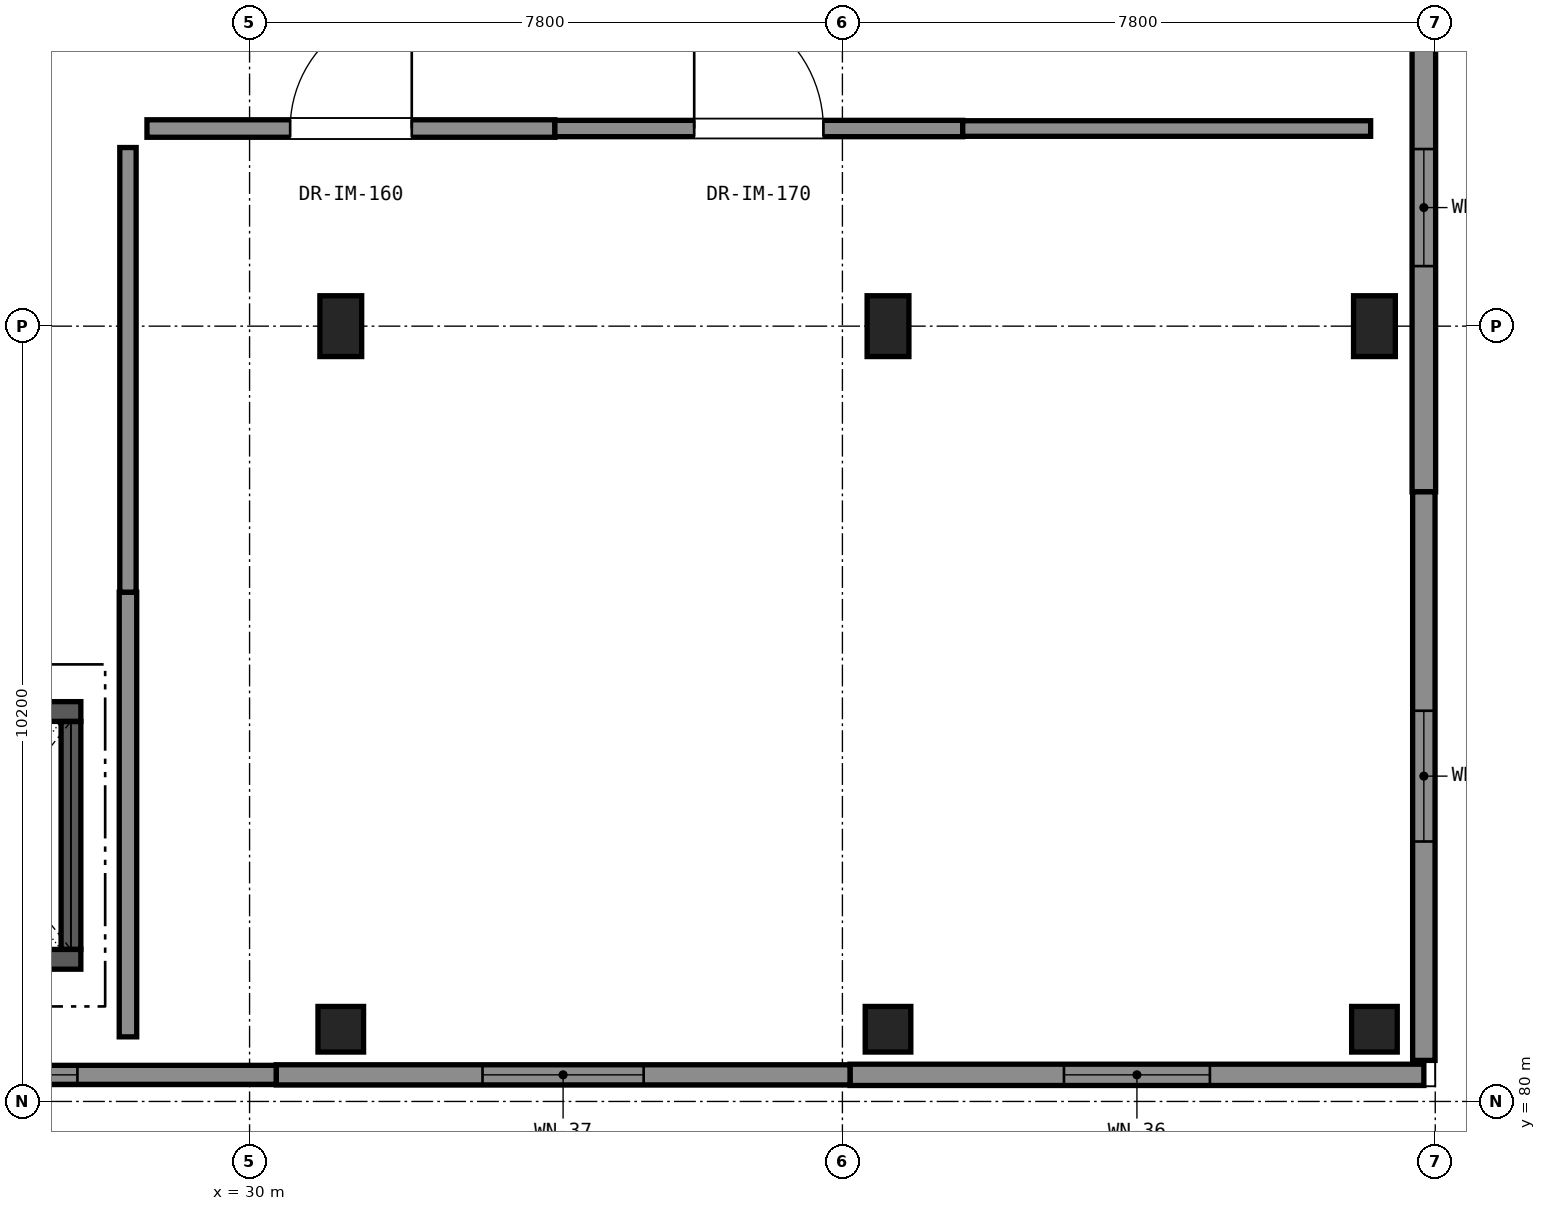
"""IFC4 building model, lengths in metres.
Left out: names, types, materials, properties, quantities, classifications, styles, units other than length and angle.
Written with IfcOpenShell. Run it as: python <this file> out.ifc"""

import sys

from ifc_helpers import new_model, si_unit, direction, frame, frame_2d, origin, origin_2d, place, context, subcontext, project, spatial, rectangle, extrude, element, fill, save


model = new_model("IFC4")
c1 = context("Model", 3, precision=1e-05, world=origin(), true_north=direction((0.0, 1.0)))
c2 = subcontext(c1, "Body", "Model", "MODEL_VIEW")
j1 = project(units=[si_unit("LENGTHUNIT", "METRE"), si_unit("PLANEANGLEUNIT", "RADIAN")], contexts=[c1])
p1 = place(None, origin())
s1 = spatial("IfcSite", under=j1, at=p1, CompositionType="ELEMENT")
p2 = place(p1, origin())
s2 = spatial("IfcBuilding", under=s1, at=p2, CompositionType="ELEMENT")
p3 = place(p2, frame((0.0, 0.0, 9.52)))
s3 = spatial("IfcBuildingStorey", under=s2, at=p3, CompositionType="ELEMENT", Elevation=9.52)
p4 = place(p3, frame((31.2, 80.95, 0.0), z_axis=(0.0, 0.0, 1.0), x_axis=(1.0, 0.0, 0.0)))
e1 = element("IfcColumn", 1, at=p4, inside=s3, PredefinedType="COLUMN", context=c2, shape_type="SweptSolid", body=[
    extrude(rectangle(XDim=0.6, YDim=0.6, at=origin_2d()), origin(), (0.0, 0.0, 1.0), 4.08),
])
p5 = place(p3, frame((31.2, 90.2, 0.0), z_axis=(0.0, 0.0, 1.0), x_axis=(1.0, 0.0, 0.0)))
e2 = element("IfcColumn", 2, at=p5, inside=s3, PredefinedType="COLUMN", context=c2, shape_type="SweptSolid", body=[
    extrude(rectangle(XDim=0.55, YDim=0.8, at=origin_2d()), origin(), (0.0, 0.0, 1.0), 4.08),
])
p6 = place(p3, frame((38.4, 80.95, 0.0), z_axis=(0.0, 0.0, 1.0), x_axis=(1.0, 0.0, 0.0)))
e3 = element("IfcColumn", 3, at=p6, inside=s3, PredefinedType="COLUMN", context=c2, shape_type="SweptSolid", body=[
    extrude(rectangle(XDim=0.6, YDim=0.6, at=origin_2d()), origin(), (0.0, 0.0, 1.0), 4.08),
])
p7 = place(p3, frame((38.4, 90.2, 0.0), z_axis=(0.0, 0.0, 1.0), x_axis=(1.0, 0.0, 0.0)))
e4 = element("IfcColumn", 4, at=p7, inside=s3, PredefinedType="COLUMN", context=c2, shape_type="SweptSolid", body=[
    extrude(rectangle(XDim=0.55, YDim=0.8, at=origin_2d()), origin(), (0.0, 0.0, 1.0), 4.08),
])
p8 = place(p3, frame((44.8, 80.95, 0.0), z_axis=(0.0, 0.0, 1.0), x_axis=(1.0, 0.0, 0.0)))
e5 = element("IfcColumn", 5, at=p8, inside=s3, PredefinedType="COLUMN", context=c2, shape_type="SweptSolid", body=[
    extrude(rectangle(XDim=0.6, YDim=0.6, at=origin_2d()), origin(), (0.0, 0.0, 1.0), 4.08),
])
p9 = place(p3, frame((44.8, 90.2, 0.0), z_axis=(0.0, 0.0, 1.0), x_axis=(1.0, 0.0, 0.0)))
e6 = element("IfcColumn", 6, at=p9, inside=s3, PredefinedType="COLUMN", context=c2, shape_type="SweptSolid", body=[
    extrude(rectangle(XDim=0.55, YDim=0.8, at=origin_2d()), origin(), (0.0, 0.0, 1.0), 4.08),
])
p10 = place(p3, frame((45.45, 95.5, 0.0), z_axis=(0.0, 0.0, 1.0), x_axis=(0.0, -1.0, 0.0)))
e7 = element("IfcWall", 7, at=p10, inside=s3, PredefinedType="SOLIDWALL", context=c2, shape_type="SweptSolid", body=[
    extrude(rectangle(XDim=7.48, YDim=0.31, at=frame_2d((3.74, 0.0))), origin(), (0.0, 0.0, 1.0), 3.843),
])
p11 = place(p10, frame((2.97, 0.0, 0.9)))
e8 = element("IfcOpeningElement", 8, at=p11, cuts=e7, PredefinedType="OPENING", context=c2, shape_type="SweptSolid", body=[
    extrude(rectangle(XDim=1.54, YDim=1.62, at=frame_2d((0.77, 0.81))), frame((0.0, 0.165, 0.0), z_axis=(0.0, -1.0, 0.0), x_axis=(1.0, 0.0, 0.0)), (0.0, 0.0, 1.0), 0.33),
])
p12 = place(p3, frame((45.45, 88.02, 0.0), z_axis=(0.0, 0.0, 1.0), x_axis=(0.0, -1.0, 0.0)))
e9 = element("IfcWall", 9, at=p12, inside=s3, PredefinedType="SOLIDWALL", context=c2, shape_type="SweptSolid", body=[
    extrude(rectangle(XDim=7.48, YDim=0.295, at=frame_2d((3.74, 0.0))), origin(), (0.0, 0.0, 1.0), 3.843),
])
p13 = place(p12, frame((2.88, 0.0, 0.9)))
e10 = element("IfcOpeningElement", 10, at=p13, cuts=e9, PredefinedType="OPENING", context=c2, shape_type="SweptSolid", body=[
    extrude(rectangle(XDim=1.72, YDim=1.62, at=frame_2d((0.86, 0.81))), frame((0.0, 0.157, 0.0), z_axis=(0.0, -1.0, 0.0), x_axis=(1.0, 0.0, 0.0)), (0.0, 0.0, 1.0), 0.315),
])
p14 = place(p3, frame((45.45, 80.35, 0.0), z_axis=(0.0, 0.0, 1.0), x_axis=(-1.0, 0.0, 0.0)))
e11 = element("IfcWall", 11, at=p14, inside=s3, PredefinedType="SOLIDWALL", context=c2, shape_type="SweptSolid", body=[
    extrude(rectangle(XDim=7.55, YDim=0.28, at=frame_2d((3.775, 0.0))), origin(), (0.0, 0.0, 1.0), 3.843),
])
p15 = place(p14, frame((2.815, 0.0, 0.9)))
e12 = element("IfcOpeningElement", 12, at=p15, cuts=e11, PredefinedType="OPENING", context=c2, shape_type="SweptSolid", body=[
    extrude(rectangle(XDim=1.92, YDim=1.62, at=frame_2d((0.96, 0.81))), frame((0.0, 0.15, 0.0), z_axis=(0.0, -1.0, 0.0), x_axis=(1.0, 0.0, 0.0)), (0.0, 0.0, 1.0), 0.3),
])
p16 = place(p3, frame((37.9, 80.35, 0.0), z_axis=(0.0, 0.0, 1.0), x_axis=(-1.0, 0.0, 0.0)))
e13 = element("IfcWall", 13, at=p16, inside=s3, PredefinedType="SOLIDWALL", context=c2, shape_type="SweptSolid", body=[
    extrude(rectangle(XDim=7.55, YDim=0.265, at=frame_2d((3.775, 0.0))), origin(), (0.0, 0.0, 1.0), 3.843),
])
p17 = place(p16, frame((2.715, 0.0, 0.9)))
e14 = element("IfcOpeningElement", 14, at=p17, cuts=e13, PredefinedType="OPENING", context=c2, shape_type="SweptSolid", body=[
    extrude(rectangle(XDim=2.12, YDim=1.62, at=frame_2d((1.06, 0.81))), frame((0.0, 0.142, 0.0), z_axis=(0.0, -1.0, 0.0), x_axis=(1.0, 0.0, 0.0)), (0.0, 0.0, 1.0), 0.285),
])
p18 = place(p3, frame((30.35, 80.35, 0.0), z_axis=(0.0, 0.0, 1.0), x_axis=(-1.0, 0.0, 0.0)))
e15 = element("IfcWall", 15, at=p18, inside=s3, PredefinedType="SOLIDWALL", context=c2, shape_type="SweptSolid", body=[
    extrude(rectangle(XDim=7.55, YDim=0.25, at=frame_2d((3.775, 0.0))), origin(), (0.0, 0.0, 1.0), 3.843),
])
p19 = place(p18, frame((2.615, 0.0, 0.9)))
e16 = element("IfcOpeningElement", 16, at=p19, cuts=e15, PredefinedType="OPENING", context=c2, shape_type="SweptSolid", body=[
    extrude(rectangle(XDim=2.32, YDim=1.62, at=frame_2d((1.16, 0.81))), frame((0.0, 0.135, 0.0), z_axis=(0.0, -1.0, 0.0), x_axis=(1.0, 0.0, 0.0)), (0.0, 0.0, 1.0), 0.27),
])
p20 = place(p3, frame((25.122, 81.87, 0.0), z_axis=(0.0, 0.0, 1.0), x_axis=(1.0, 0.0, 0.0)))
e17 = element("IfcWall", 17, at=p20, inside=s3, PredefinedType="SHEAR", context=c2, shape_type="SweptSolid", body=[
    extrude(rectangle(XDim=2.658, YDim=0.26, at=frame_2d((1.329, 0.0))), origin(), (0.0, 0.0, 1.0), 3.843),
])
p21 = place(p3, frame((25.122, 85.13, 0.0), z_axis=(0.0, 0.0, 1.0), x_axis=(1.0, 0.0, 0.0)))
e18 = element("IfcWall", 18, at=p21, inside=s3, PredefinedType="SHEAR", context=c2, shape_type="SweptSolid", body=[
    extrude(rectangle(XDim=2.658, YDim=0.26, at=frame_2d((1.329, 0.0))), origin(), (0.0, 0.0, 1.0), 3.843),
])
p22 = place(p21, frame((0.679, 0.0, 0.0)))
e19 = element("IfcOpeningElement", 19, at=p22, cuts=e18, PredefinedType="OPENING", context=c2, shape_type="SweptSolid", body=[
    extrude(rectangle(XDim=1.3, YDim=2.2, at=frame_2d((0.65, 1.1))), frame((0.0, 0.14, 0.0), z_axis=(0.0, -1.0, 0.0), x_axis=(1.0, 0.0, 0.0)), (0.0, 0.0, 1.0), 0.28),
])
p23 = place(p3, frame((27.65, 82.002, 0.0), z_axis=(0.0, 0.0, 1.0), x_axis=(0.0, 1.0, 0.0)))
e20 = element("IfcWall", 20, at=p23, inside=s3, PredefinedType="SHEAR", context=c2, shape_type="SweptSolid", body=[
    extrude(rectangle(XDim=2.996, YDim=0.26, at=frame_2d((1.498, 0.0))), origin(), (0.0, 0.0, 1.0), 3.843),
])
p24 = place(p3, frame((28.65, 92.8, 0.0), z_axis=(0.0, 0.0, 1.0), x_axis=(1.0, 0.0, 0.0)))
e21 = element("IfcWall", 21, at=p24, inside=s3, PredefinedType="PARTITIONING", context=c2, shape_type="SweptSolid", body=[
    extrude(rectangle(XDim=5.367, YDim=0.23, at=frame_2d((2.684, 0.0))), origin(), (0.0, 0.0, 1.0), 3.293),
])
p25 = place(p24, frame((1.884, 0.0, 0.0)))
e22 = element("IfcOpeningElement", 22, at=p25, cuts=e21, PredefinedType="OPENING", context=c2, shape_type="SweptSolid", body=[
    extrude(rectangle(XDim=1.6, YDim=2.35, at=frame_2d((0.8, 1.175))), frame((0.0, 0.125, 0.0), z_axis=(0.0, -1.0, 0.0), x_axis=(1.0, 0.0, 0.0)), (0.0, 0.0, 1.0), 0.25),
])
p26 = place(p3, frame((34.017, 92.8, 0.0), z_axis=(0.0, 0.0, 1.0), x_axis=(1.0, 0.0, 0.0)))
e23 = element("IfcWall", 23, at=p26, inside=s3, PredefinedType="PARTITIONING", context=c2, shape_type="SweptSolid", body=[
    extrude(rectangle(XDim=5.366, YDim=0.215, at=frame_2d((2.683, 0.0))), origin(), (0.0, 0.0, 1.0), 3.143),
])
p27 = place(p26, frame((1.833, 0.0, 0.0)))
e24 = element("IfcOpeningElement", 24, at=p27, cuts=e23, PredefinedType="OPENING", context=c2, shape_type="SweptSolid", body=[
    extrude(rectangle(XDim=1.7, YDim=2.35, at=frame_2d((0.85, 1.175))), frame((0.0, 0.117, 0.0), z_axis=(0.0, -1.0, 0.0), x_axis=(1.0, 0.0, 0.0)), (0.0, 0.0, 1.0), 0.235),
])
p28 = place(p3, frame((39.383, 92.8, 0.0), z_axis=(0.0, 0.0, 1.0), x_axis=(1.0, 0.0, 0.0)))
e25 = element("IfcWall", 25, at=p28, inside=s3, PredefinedType="PARTITIONING", context=c2, shape_type="SweptSolid", body=[
    extrude(rectangle(XDim=5.367, YDim=0.205, at=frame_2d((2.684, 0.0))), origin(), (0.0, 0.0, 1.0), 3.043),
])
p29 = place(p3, frame((28.4, 80.85, 0.0), z_axis=(0.0, 0.0, 1.0), x_axis=(0.0, 1.0, 0.0)))
e26 = element("IfcWall", 26, at=p29, inside=s3, PredefinedType="PARTITIONING", context=c2, shape_type="SweptSolid", body=[
    extrude(rectangle(XDim=5.85, YDim=0.23, at=frame_2d((2.925, 0.0))), origin(), (0.0, 0.0, 1.0), 3.043),
])
p30 = place(p3, frame((28.4, 86.7, 0.0), z_axis=(0.0, 0.0, 1.0), x_axis=(0.0, 1.0, 0.0)))
e27 = element("IfcWall", 27, at=p30, inside=s3, PredefinedType="PARTITIONING", context=c2, shape_type="SweptSolid", body=[
    extrude(rectangle(XDim=5.85, YDim=0.215, at=frame_2d((2.925, 0.0))), origin(), (0.0, 0.0, 1.0), 3.043),
])
p31 = place(p11, origin())
e28 = element("IfcWindow", 28, at=p31, inside=s3, PartitioningType="SINGLE_PANEL", PredefinedType="WINDOW", context=c2, shape_type="SweptSolid", body=[
    extrude(rectangle(XDim=1.54, YDim=1.62, at=frame_2d((0.77, 0.81))), frame((0.0, 0.03, 0.0), z_axis=(0.0, -1.0, 0.0), x_axis=(1.0, 0.0, 0.0)), (0.0, 0.0, 1.0), 0.06),
])
fill(e8, e28)
p32 = place(p13, origin())
e29 = element("IfcWindow", 29, at=p32, inside=s3, PartitioningType="SINGLE_PANEL", PredefinedType="WINDOW", context=c2, shape_type="SweptSolid", body=[
    extrude(rectangle(XDim=1.72, YDim=1.62, at=frame_2d((0.86, 0.81))), frame((0.0, 0.03, 0.0), z_axis=(0.0, -1.0, 0.0), x_axis=(1.0, 0.0, 0.0)), (0.0, 0.0, 1.0), 0.06),
])
fill(e10, e29)
p33 = place(p15, origin())
e30 = element("IfcWindow", 30, at=p33, inside=s3, PartitioningType="SINGLE_PANEL", PredefinedType="WINDOW", context=c2, shape_type="SweptSolid", body=[
    extrude(rectangle(XDim=1.92, YDim=1.62, at=frame_2d((0.96, 0.81))), frame((0.0, 0.03, 0.0), z_axis=(0.0, -1.0, 0.0), x_axis=(1.0, 0.0, 0.0)), (0.0, 0.0, 1.0), 0.06),
])
fill(e12, e30)
p34 = place(p17, origin())
e31 = element("IfcWindow", 31, at=p34, inside=s3, PartitioningType="SINGLE_PANEL", PredefinedType="WINDOW", context=c2, shape_type="SweptSolid", body=[
    extrude(rectangle(XDim=2.12, YDim=1.62, at=frame_2d((1.06, 0.81))), frame((0.0, 0.03, 0.0), z_axis=(0.0, -1.0, 0.0), x_axis=(1.0, 0.0, 0.0)), (0.0, 0.0, 1.0), 0.06),
])
fill(e14, e31)
p35 = place(p19, origin())
e32 = element("IfcWindow", 32, at=p35, inside=s3, PartitioningType="SINGLE_PANEL", PredefinedType="WINDOW", context=c2, shape_type="SweptSolid", body=[
    extrude(rectangle(XDim=2.32, YDim=1.62, at=frame_2d((1.16, 0.81))), frame((0.0, 0.03, 0.0), z_axis=(0.0, -1.0, 0.0), x_axis=(1.0, 0.0, 0.0)), (0.0, 0.0, 1.0), 0.06),
])
fill(e16, e32)
p36 = place(p25, origin())
e33 = element("IfcDoor", 33, at=p36, inside=s3, OperationType="SINGLE_SWING_RIGHT", PredefinedType="DOOR", context=c2, shape_type="SweptSolid", body=[
    extrude(rectangle(XDim=1.6, YDim=2.35, at=frame_2d((0.8, 1.175))), frame((0.0, 0.025, 0.0), z_axis=(0.0, -1.0, 0.0), x_axis=(1.0, 0.0, 0.0)), (0.0, 0.0, 1.0), 0.05),
])
fill(e22, e33)
p37 = place(p27, origin())
e34 = element("IfcDoor", 34, at=p37, inside=s3, OperationType="SINGLE_SWING_LEFT", PredefinedType="DOOR", context=c2, shape_type="SweptSolid", body=[
    extrude(rectangle(XDim=1.7, YDim=2.35, at=frame_2d((0.85, 1.175))), frame((0.0, 0.025, 0.0), z_axis=(0.0, -1.0, 0.0), x_axis=(1.0, 0.0, 0.0)), (0.0, 0.0, 1.0), 0.05),
])
fill(e24, e34)
save(model, sys.argv[1])
